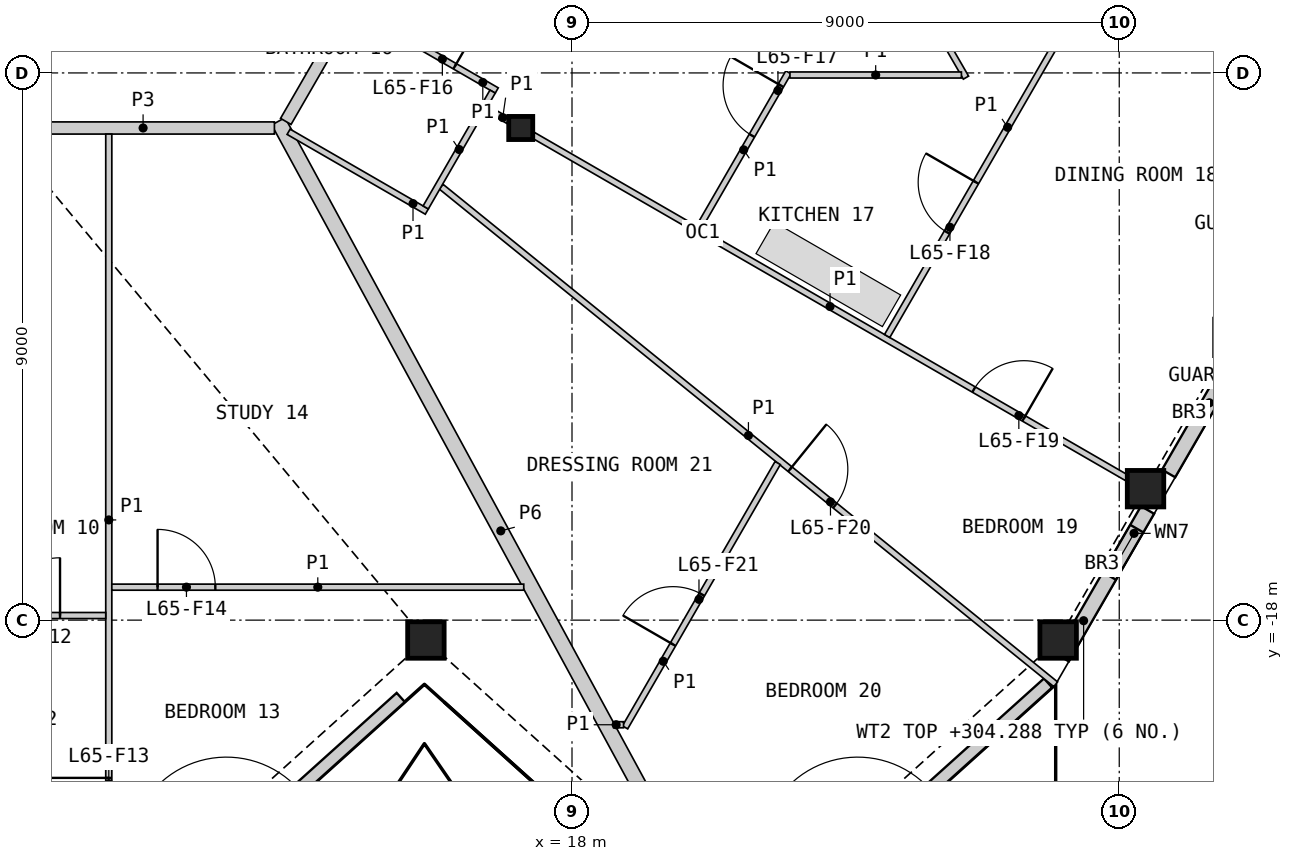
"""IFC4 building model, lengths in metres.
Left out: names, types, materials, properties, quantities, classifications, styles, units other than length and angle.
Written with IfcOpenShell. Run it as: python <this file> out.ifc"""

import sys

from ifc_helpers import new_model, si_unit, direction, frame, frame_2d, origin, origin_2d, place, context, subcontext, project, spatial, rectangle, hollow_rectangle, i_section, extrude, element, fill, save


model = new_model("IFC4")
c1 = context("Model", 3, precision=1e-05, world=origin(), true_north=direction((0.0, 1.0)))
c2 = subcontext(c1, "Body", "Model", "MODEL_VIEW")
j1 = project(units=[si_unit("LENGTHUNIT", "METRE"), si_unit("PLANEANGLEUNIT", "RADIAN")], contexts=[c1])
p1 = place(None, origin())
s1 = spatial("IfcSite", under=j1, at=p1, CompositionType="ELEMENT")
p2 = place(p1, origin())
s2 = spatial("IfcBuilding", under=s1, at=p2, CompositionType="ELEMENT")
p3 = place(p2, frame((0.0, 0.0, 301.8)))
s3 = spatial("IfcBuildingStorey", under=s2, at=p3, CompositionType="ELEMENT", Elevation=301.8)
for number, where, z_axis, x_axis in (
    (1, (15.597, -18.327, 0.0), (0.0, 0.0, 1.0), (1.0, 0.0, 0.0)),
    (2, (25.995, -18.327, 0.0), (0.0, 0.0, 1.0), (1.0, 0.0, 0.0)),
    (3, (27.432, -15.838, 0.0), (0.0, 0.0, 1.0), (1.0, 0.0, 0.0)),
):
    element("IfcColumn", number, at=place(p3, frame(where, z_axis=z_axis, x_axis=x_axis)), inside=s3, PredefinedType="COLUMN", context=c2, shape_type="SweptSolid", body=[
        extrude(hollow_rectangle(XDim=0.6, YDim=0.6, WallThickness=0.04, at=origin_2d()), origin(), (0.0, 0.0, 1.0), 3.4),
    ])
p4 = place(p3, frame((17.157, -9.906, 0.0), z_axis=(0.0, 0.0, 1.0), x_axis=(1.0, 0.0, 0.0)))
e4 = element("IfcColumn", 4, at=p4, inside=s3, PredefinedType="COLUMN", context=c2, shape_type="SweptSolid", body=[
    extrude(i_section(OverallWidth=0.396, OverallDepth=0.381, WebThickness=0.019, FlangeThickness=0.03, at=origin_2d()), origin(), (0.0, 0.0, 1.0), 3.4),
])
p5 = place(p3, frame((10.485, -23.501, 0.0), z_axis=(0.0, 0.0, 1.0), x_axis=(0.743134744054, 0.669141802745, 0.0)))
e5 = element("IfcWall", 5, at=p5, inside=s3, PredefinedType="SOLIDWALL", context=c2, shape_type="SweptSolid", body=[
    extrude(rectangle(XDim=6.322, YDim=0.2, at=frame_2d((3.161, 0.0))), origin(), (0.0, 0.0, 1.0), 2.488),
])
p6 = place(p5, frame((2.463, 0.0, 0.0)))
e6 = element("IfcOpeningElement", 6, at=p6, cuts=e5, PredefinedType="OPENING", context=c2, shape_type="SweptSolid", body=[
    extrude(rectangle(XDim=1.6, YDim=2.25, at=frame_2d((0.8, 1.125))), frame((0.0, 0.11, 0.0), z_axis=(0.0, -1.0, 0.0), x_axis=(1.0, 0.0, 0.0)), (0.0, 0.0, 1.0), 0.22),
])
p7 = place(p3, frame((20.806, -23.556, 0.0), z_axis=(0.0, 0.0, 1.0), x_axis=(0.743145048269, 0.669130358924, 0.0)))
e7 = element("IfcWall", 7, at=p7, inside=s3, PredefinedType="SOLIDWALL", context=c2, shape_type="SweptSolid", body=[
    extrude(rectangle(XDim=6.759, YDim=0.2, at=frame_2d((3.379, 0.0))), origin(), (0.0, 0.0, 1.0), 2.488),
])
p8 = place(p7, frame((2.545, 0.0, 0.0)))
e8 = element("IfcOpeningElement", 8, at=p8, cuts=e7, PredefinedType="OPENING", context=c2, shape_type="SweptSolid", body=[
    extrude(rectangle(XDim=1.6, YDim=2.25, at=frame_2d((0.8, 1.125))), frame((0.0, 0.11, 0.0), z_axis=(0.0, -1.0, 0.0), x_axis=(1.0, 0.0, 0.0)), (0.0, 0.0, 1.0), 0.22),
])
p9 = place(p3, frame((26.063, -18.617, 0.0), z_axis=(0.0, 0.0, 1.0), x_axis=(0.499968627931, 0.866043515699, 0.0)))
e9 = element("IfcWall", 9, at=p9, inside=s3, PredefinedType="SOLIDWALL", context=c2, shape_type="SweptSolid", body=[
    extrude(rectangle(XDim=2.804, YDim=0.25, at=frame_2d((1.402, 0.0))), origin(), (0.0, 0.0, 1.0), 2.488),
])
p10 = place(p9, frame((1.55, 0.0, 1.6)))
e10 = element("IfcOpeningElement", 10, at=p10, cuts=e9, PredefinedType="OPENING", context=c2, shape_type="SweptSolid", body=[
    extrude(rectangle(XDim=0.9, YDim=0.6, at=frame_2d((0.45, 0.3))), frame((0.0, 0.135, 0.0), z_axis=(0.0, -1.0, 0.0), x_axis=(1.0, 0.0, 0.0)), (0.0, 0.0, 1.0), 0.27),
])
p11 = place(p3, frame((27.812, -15.588, 0.0), z_axis=(0.0, 0.0, 1.0), x_axis=(0.500032109083, 0.866006864803, 0.0)))
e11 = element("IfcWall", 11, at=p11, inside=s3, PredefinedType="SOLIDWALL", context=c2, shape_type="SweptSolid", body=[
    extrude(rectangle(XDim=2.684, YDim=0.25, at=frame_2d((1.342, 0.0))), origin(), (0.0, 0.0, 1.0), 2.488),
])
p12 = place(p3, frame((13.171, -9.796, 0.0), z_axis=(0.0, 0.0, 1.0), x_axis=(0.477178668135, -0.878806303275, 0.0)))
e12 = element("IfcWall", 12, at=p12, inside=s3, PredefinedType="PARTITIONING", context=c2, shape_type="SweptSolid", body=[
    extrude(rectangle(XDim=15.33, YDim=0.25, at=frame_2d((7.665, 0.0))), origin(), (0.0, 0.0, 1.0), 2.33),
])
p13 = place(p3, frame((8.786, -9.906, 0.0), z_axis=(0.0, 0.0, 1.0), x_axis=(1.0, 0.0, 0.0)))
e13 = element("IfcWall", 13, at=p13, inside=s3, PredefinedType="PARTITIONING", context=c2, shape_type="SweptSolid", body=[
    extrude(rectangle(XDim=4.32, YDim=0.2, at=frame_2d((2.16, 0.0))), origin(), (0.0, 0.0, 1.0), 3.1),
])
p14 = place(p3, frame((13.293, -9.797, 0.0), z_axis=(0.0, 0.0, 1.0), x_axis=(0.499967746641, 0.866044024469, 0.0)))
e14 = element("IfcWall", 14, at=p14, inside=s3, PredefinedType="PARTITIONING", context=c2, shape_type="SweptSolid", body=[
    extrude(rectangle(XDim=3.676, YDim=0.2, at=frame_2d((1.838, 0.0))), origin(), (0.0, 0.0, 1.0), 3.1),
])
p15 = place(p14, frame((2.426, 0.0, 0.0)))
e15 = element("IfcOpeningElement", 15, at=p15, cuts=e14, PredefinedType="OPENING", context=c2, shape_type="SweptSolid", body=[
    extrude(rectangle(XDim=1.0, YDim=2.1, at=frame_2d((0.5, 1.05))), frame((0.0, 0.11, 0.0), z_axis=(0.0, -1.0, 0.0), x_axis=(1.0, 0.0, 0.0)), (0.0, 0.0, 1.0), 0.22),
])
p16 = place(p3, frame((15.848, -10.871, 0.0), z_axis=(0.0, 0.0, 1.0), x_axis=(0.77713687197, -0.629331615465, 0.0)))
e16 = element("IfcWall", 16, at=p16, inside=s3, PredefinedType="PARTITIONING", context=c2, shape_type="SweptSolid", body=[
    extrude(rectangle(XDim=13.004, YDim=0.1, at=frame_2d((6.502, 0.0))), origin(), (0.0, 0.0, 1.0), 2.33),
])
p17 = place(p16, frame((7.384, 0.0, 0.0)))
e17 = element("IfcOpeningElement", 17, at=p17, cuts=e16, PredefinedType="OPENING", context=c2, shape_type="SweptSolid", body=[
    extrude(rectangle(XDim=0.95, YDim=2.1, at=frame_2d((0.475, 1.05))), frame((0.0, 0.06, 0.0), z_axis=(0.0, -1.0, 0.0), x_axis=(1.0, 0.0, 0.0)), (0.0, 0.0, 1.0), 0.12),
])
p18 = place(p3, frame((10.382, -22.698, 0.0), z_axis=(0.0, 0.0, 1.0), x_axis=(0.0, 1.0, 0.0)))
e18 = element("IfcWall", 18, at=p18, inside=s3, PredefinedType="PARTITIONING", context=c2, shape_type="SweptSolid", body=[
    extrude(rectangle(XDim=12.692, YDim=0.1, at=frame_2d((6.346, 0.0))), origin(), (0.0, 0.0, 1.0), 2.33),
])
p19 = place(p18, frame((1.153, 0.0, 0.0)))
e19 = element("IfcOpeningElement", 19, at=p19, cuts=e18, PredefinedType="OPENING", context=c2, shape_type="SweptSolid", body=[
    extrude(rectangle(XDim=0.95, YDim=2.1, at=frame_2d((0.475, 1.05))), frame((0.0, 0.06, 0.0), z_axis=(0.0, -1.0, 0.0), x_axis=(1.0, 0.0, 0.0)), (0.0, 0.0, 1.0), 0.12),
])
p20 = place(p3, frame((17.365, -10.025, 0.0), z_axis=(0.0, 0.0, 1.0), x_axis=(0.866021046153, -0.500007547564, 0.0)))
e20 = element("IfcWall", 20, at=p20, inside=s3, PredefinedType="PARTITIONING", context=c2, shape_type="SweptSolid", body=[
    extrude(rectangle(XDim=11.267, YDim=0.1, at=frame_2d((5.634, 0.0))), origin(), (0.0, 0.0, 1.0), 2.33),
])
p21 = place(p20, frame((8.364, 0.0, 0.0)))
e21 = element("IfcOpeningElement", 21, at=p21, cuts=e20, PredefinedType="OPENING", context=c2, shape_type="SweptSolid", body=[
    extrude(rectangle(XDim=0.95, YDim=2.1, at=frame_2d((0.475, 1.05))), frame((0.0, 0.06, 0.0), z_axis=(0.0, -1.0, 0.0), x_axis=(1.0, 0.0, 0.0)), (0.0, 0.0, 1.0), 0.12),
])
p22 = place(p3, frame((0.05, -17.924, 0.0), z_axis=(0.0, 0.0, 1.0), x_axis=(1.0, 0.0, 0.0)))
e22 = element("IfcWall", 22, at=p22, inside=s3, PredefinedType="PARTITIONING", context=c2, shape_type="SweptSolid", body=[
    extrude(rectangle(XDim=10.282, YDim=0.1, at=frame_2d((5.141, 0.0))), origin(), (0.0, 0.0, 1.0), 2.33),
])
p23 = place(p22, frame((0.752, 0.0, 0.0)))
e23 = element("IfcOpeningElement", 23, at=p23, cuts=e22, PredefinedType="OPENING", context=c2, shape_type="SweptSolid", body=[
    extrude(rectangle(XDim=0.95, YDim=2.1, at=frame_2d((0.475, 1.05))), frame((0.0, 0.06, 0.0), z_axis=(0.0, -1.0, 0.0), x_axis=(1.0, 0.0, 0.0)), (0.0, 0.0, 1.0), 0.12),
])
p24 = place(p22, frame((8.58, 0.0, 0.0)))
e24 = element("IfcOpeningElement", 24, at=p24, cuts=e22, PredefinedType="OPENING", context=c2, shape_type="SweptSolid", body=[
    extrude(rectangle(XDim=0.95, YDim=2.1, at=frame_2d((0.475, 1.05))), frame((0.0, 0.06, 0.0), z_axis=(0.0, -1.0, 0.0), x_axis=(1.0, 0.0, 0.0)), (0.0, 0.0, 1.0), 0.12),
])
p25 = place(p3, frame((23.183, -13.327, 0.0), z_axis=(0.0, 0.0, 1.0), x_axis=(0.499991741039, 0.866030172045, 0.0)))
e25 = element("IfcWall", 25, at=p25, inside=s3, PredefinedType="PARTITIONING", context=c2, shape_type="SweptSolid", body=[
    extrude(rectangle(XDim=7.927, YDim=0.1, at=frame_2d((3.963, 0.0))), origin(), (0.0, 0.0, 1.0), 2.33),
])
p26 = place(p25, frame((1.97, 0.0, 0.0)))
e26 = element("IfcOpeningElement", 26, at=p26, cuts=e25, PredefinedType="OPENING", context=c2, shape_type="SweptSolid", body=[
    extrude(rectangle(XDim=0.95, YDim=2.1, at=frame_2d((0.475, 1.05))), frame((0.0, 0.06, 0.0), z_axis=(0.0, -1.0, 0.0), x_axis=(1.0, 0.0, 0.0)), (0.0, 0.0, 1.0), 0.12),
])
p27 = place(p3, frame((10.432, -17.458, 0.0), z_axis=(0.0, 0.0, 1.0), x_axis=(1.0, 0.0, 0.0)))
e27 = element("IfcWall", 27, at=p27, inside=s3, PredefinedType="PARTITIONING", context=c2, shape_type="SweptSolid", body=[
    extrude(rectangle(XDim=6.775, YDim=0.1, at=frame_2d((3.387, 0.0))), origin(), (0.0, 0.0, 1.0), 2.33),
])
p28 = place(p27, frame((0.752, 0.0, 0.0)))
e28 = element("IfcOpeningElement", 28, at=p28, cuts=e27, PredefinedType="OPENING", context=c2, shape_type="SweptSolid", body=[
    extrude(rectangle(XDim=0.95, YDim=2.1, at=frame_2d((0.475, 1.05))), frame((0.0, 0.06, 0.0), z_axis=(0.0, -1.0, 0.0), x_axis=(1.0, 0.0, 0.0)), (0.0, 0.0, 1.0), 0.12),
])
p29 = place(p3, frame((18.873, -19.764, 0.0), z_axis=(0.0, 0.0, 1.0), x_axis=(0.499983455602, 0.866034955486, 0.0)))
e29 = element("IfcWall", 29, at=p29, inside=s3, PredefinedType="PARTITIONING", context=c2, shape_type="SweptSolid", body=[
    extrude(rectangle(XDim=5.02, YDim=0.1, at=frame_2d((2.51, 0.0))), origin(), (0.0, 0.0, 1.0), 2.33),
])
p30 = place(p29, frame((1.576, 0.0, 0.0)))
e30 = element("IfcOpeningElement", 30, at=p30, cuts=e29, PredefinedType="OPENING", context=c2, shape_type="SweptSolid", body=[
    extrude(rectangle(XDim=0.95, YDim=2.1, at=frame_2d((0.475, 1.05))), frame((0.0, 0.06, 0.0), z_axis=(0.0, -1.0, 0.0), x_axis=(1.0, 0.0, 0.0)), (0.0, 0.0, 1.0), 0.12),
])
p31 = place(p3, frame((22.941, -6.413, 0.0), z_axis=(0.0, 0.0, 1.0), x_axis=(0.500013199183, -0.866017783098, 0.0)))
e31 = element("IfcWall", 31, at=p31, inside=s3, PredefinedType="PARTITIONING", context=c2, shape_type="SweptSolid", body=[
    extrude(rectangle(XDim=3.077, YDim=0.1, at=frame_2d((1.539, 0.0))), origin(), (0.0, 0.0, 1.0), 2.33),
])
p32 = place(p3, frame((20.088, -11.54, 0.0), z_axis=(0.0, 0.0, 1.0), x_axis=(0.500055103712, 0.865993587304, 0.0)))
e32 = element("IfcWall", 32, at=p32, inside=s3, PredefinedType="PARTITIONING", context=c2, shape_type="SweptSolid", body=[
    extrude(rectangle(XDim=2.944, YDim=0.1, at=frame_2d((1.472, 0.0))), origin(), (0.0, 0.0, 1.0), 2.33),
])
p33 = place(p32, frame((1.744, 0.0, 0.0)))
e33 = element("IfcOpeningElement", 33, at=p33, cuts=e32, PredefinedType="OPENING", context=c2, shape_type="SweptSolid", body=[
    extrude(rectangle(XDim=0.95, YDim=2.1, at=frame_2d((0.475, 1.05))), frame((0.0, 0.06, 0.0), z_axis=(0.0, -1.0, 0.0), x_axis=(1.0, 0.0, 0.0)), (0.0, 0.0, 1.0), 0.12),
])
p34 = place(p3, frame((21.584, -9.034, 0.0), z_axis=(0.0, 0.0, 1.0), x_axis=(1.0, 0.0, 0.0)))
e34 = element("IfcWall", 34, at=p34, inside=s3, PredefinedType="PARTITIONING", context=c2, shape_type="SweptSolid", body=[
    extrude(rectangle(XDim=2.82, YDim=0.1, at=frame_2d((1.41, 0.0))), origin(), (0.0, 0.0, 1.0), 2.33),
])
p35 = place(p3, frame((14.468, -7.964, 0.0), z_axis=(0.0, 0.0, 1.0), x_axis=(0.865989200783, -0.500062700197, 0.0)))
e35 = element("IfcWall", 35, at=p35, inside=s3, PredefinedType="PARTITIONING", context=c2, shape_type="SweptSolid", body=[
    extrude(rectangle(XDim=2.65, YDim=0.1, at=frame_2d((1.325, 0.0))), origin(), (0.0, 0.0, 1.0), 2.33),
])
p36 = place(p35, frame((0.905, 0.0, 0.0)))
e36 = element("IfcOpeningElement", 36, at=p36, cuts=e35, PredefinedType="OPENING", context=c2, shape_type="SweptSolid", body=[
    extrude(rectangle(XDim=0.95, YDim=2.1, at=frame_2d((0.475, 1.05))), frame((0.0, 0.06, 0.0), z_axis=(0.0, -1.0, 0.0), x_axis=(1.0, 0.0, 0.0)), (0.0, 0.0, 1.0), 0.12),
])
p37 = place(p3, frame((13.339, -9.968, 0.0), z_axis=(0.0, 0.0, 1.0), x_axis=(0.866036909293, -0.499980071345, 0.0)))
e37 = element("IfcWall", 37, at=p37, inside=s3, PredefinedType="PARTITIONING", context=c2, shape_type="SweptSolid", body=[
    extrude(rectangle(XDim=2.625, YDim=0.1, at=frame_2d((1.312, 0.0))), origin(), (0.0, 0.0, 1.0), 2.33),
])
p38 = place(p3, frame((15.594, -11.212, 0.0), z_axis=(0.0, 0.0, 1.0), x_axis=(0.499898558967, 0.866083962871, 0.0)))
e38 = element("IfcWall", 38, at=p38, inside=s3, PredefinedType="PARTITIONING", context=c2, shape_type="SweptSolid", body=[
    extrude(rectangle(XDim=2.2, YDim=0.1, at=frame_2d((1.1, 0.0))), origin(), (0.0, 0.0, 1.0), 2.33),
])
p39 = place(p3, frame((16.594, -9.581, 0.0), z_axis=(0.0, 0.0, 1.0), x_axis=(0.866036909293, -0.499980071345, 0.0)))
e39 = element("IfcWall", 39, at=p39, inside=s3, PredefinedType="PARTITIONING", context=c2, shape_type="SweptSolid", body=[
    extrude(rectangle(XDim=0.41, YDim=0.1, at=frame_2d((0.205, 0.0))), origin(), (0.0, 0.0, 1.0), 2.33),
])
p40 = place(p3, frame((18.685, -19.721, 0.0), z_axis=(0.0, 0.0, 1.0), x_axis=(1.0, 0.0, 0.0)))
e40 = element("IfcWall", 40, at=p40, inside=s3, PredefinedType="PARTITIONING", context=c2, shape_type="SweptSolid", body=[
    extrude(rectangle(XDim=0.162, YDim=0.1, at=frame_2d((0.081, 0.0))), origin(), (0.0, 0.0, 1.0), 2.33),
])
p41 = place(p10, origin())
e41 = element("IfcWindow", 41, at=p41, inside=s3, PartitioningType="SINGLE_PANEL", PredefinedType="WINDOW", context=c2, shape_type="SweptSolid", body=[
    extrude(rectangle(XDim=0.9, YDim=0.6, at=frame_2d((0.45, 0.3))), frame((0.0, 0.03, 0.0), z_axis=(0.0, -1.0, 0.0), x_axis=(1.0, 0.0, 0.0)), (0.0, 0.0, 1.0), 0.06),
])
fill(e10, e41)
p42 = place(p24, origin())
e42 = element("IfcDoor", 42, at=p42, inside=s3, OperationType="SINGLE_SWING_RIGHT", PredefinedType="DOOR", context=c2, shape_type="SweptSolid", body=[
    extrude(rectangle(XDim=0.95, YDim=2.1, at=frame_2d((0.475, 1.05))), frame((0.0, 0.025, 0.0), z_axis=(0.0, -1.0, 0.0), x_axis=(1.0, 0.0, 0.0)), (0.0, 0.0, 1.0), 0.05),
])
fill(e24, e42)
p43 = place(p19, origin())
e43 = element("IfcDoor", 43, at=p43, inside=s3, OperationType="SINGLE_SWING_RIGHT", PredefinedType="DOOR", context=c2, shape_type="SweptSolid", body=[
    extrude(rectangle(XDim=0.95, YDim=2.1, at=frame_2d((0.475, 1.05))), frame((0.0, 0.025, 0.0), z_axis=(0.0, -1.0, 0.0), x_axis=(1.0, 0.0, 0.0)), (0.0, 0.0, 1.0), 0.05),
])
fill(e19, e43)
p44 = place(p28, origin())
e44 = element("IfcDoor", 44, at=p44, inside=s3, OperationType="SINGLE_SWING_LEFT", PredefinedType="DOOR", context=c2, shape_type="SweptSolid", body=[
    extrude(rectangle(XDim=0.95, YDim=2.1, at=frame_2d((0.475, 1.05))), frame((0.0, 0.025, 0.0), z_axis=(0.0, -1.0, 0.0), x_axis=(1.0, 0.0, 0.0)), (0.0, 0.0, 1.0), 0.05),
])
fill(e28, e44)
p45 = place(p36, origin())
e45 = element("IfcDoor", 45, at=p45, inside=s3, OperationType="SINGLE_SWING_RIGHT", PredefinedType="DOOR", context=c2, shape_type="SweptSolid", body=[
    extrude(rectangle(XDim=0.95, YDim=2.1, at=frame_2d((0.475, 1.05))), frame((0.0, 0.025, 0.0), z_axis=(0.0, -1.0, 0.0), x_axis=(1.0, 0.0, 0.0)), (0.0, 0.0, 1.0), 0.05),
])
fill(e36, e45)
p46 = place(p33, origin())
e46 = element("IfcDoor", 46, at=p46, inside=s3, OperationType="SINGLE_SWING_RIGHT", PredefinedType="DOOR", context=c2, shape_type="SweptSolid", body=[
    extrude(rectangle(XDim=0.95, YDim=2.1, at=frame_2d((0.475, 1.05))), frame((0.0, 0.025, 0.0), z_axis=(0.0, -1.0, 0.0), x_axis=(1.0, 0.0, 0.0)), (0.0, 0.0, 1.0), 0.05),
])
fill(e33, e46)
p47 = place(p26, origin())
e47 = element("IfcDoor", 47, at=p47, inside=s3, OperationType="SINGLE_SWING_RIGHT", PredefinedType="DOOR", context=c2, shape_type="SweptSolid", body=[
    extrude(rectangle(XDim=0.95, YDim=2.1, at=frame_2d((0.475, 1.05))), frame((0.0, 0.025, 0.0), z_axis=(0.0, -1.0, 0.0), x_axis=(1.0, 0.0, 0.0)), (0.0, 0.0, 1.0), 0.05),
])
fill(e26, e47)
p48 = place(p21, origin())
e48 = element("IfcDoor", 48, at=p48, inside=s3, OperationType="SINGLE_SWING_RIGHT", PredefinedType="DOOR", context=c2, shape_type="SweptSolid", body=[
    extrude(rectangle(XDim=0.95, YDim=2.1, at=frame_2d((0.475, 1.05))), frame((0.0, 0.025, 0.0), z_axis=(0.0, -1.0, 0.0), x_axis=(1.0, 0.0, 0.0)), (0.0, 0.0, 1.0), 0.05),
])
fill(e21, e48)
p49 = place(p17, origin())
e49 = element("IfcDoor", 49, at=p49, inside=s3, OperationType="SINGLE_SWING_LEFT", PredefinedType="DOOR", context=c2, shape_type="SweptSolid", body=[
    extrude(rectangle(XDim=0.95, YDim=2.1, at=frame_2d((0.475, 1.05))), frame((0.0, 0.025, 0.0), z_axis=(0.0, -1.0, 0.0), x_axis=(1.0, 0.0, 0.0)), (0.0, 0.0, 1.0), 0.05),
])
fill(e17, e49)
p50 = place(p30, origin())
e50 = element("IfcDoor", 50, at=p50, inside=s3, OperationType="SINGLE_SWING_LEFT", PredefinedType="DOOR", context=c2, shape_type="SweptSolid", body=[
    extrude(rectangle(XDim=0.95, YDim=2.1, at=frame_2d((0.475, 1.05))), frame((0.0, 0.025, 0.0), z_axis=(0.0, -1.0, 0.0), x_axis=(1.0, 0.0, 0.0)), (0.0, 0.0, 1.0), 0.05),
])
fill(e30, e50)
save(model, sys.argv[1])
